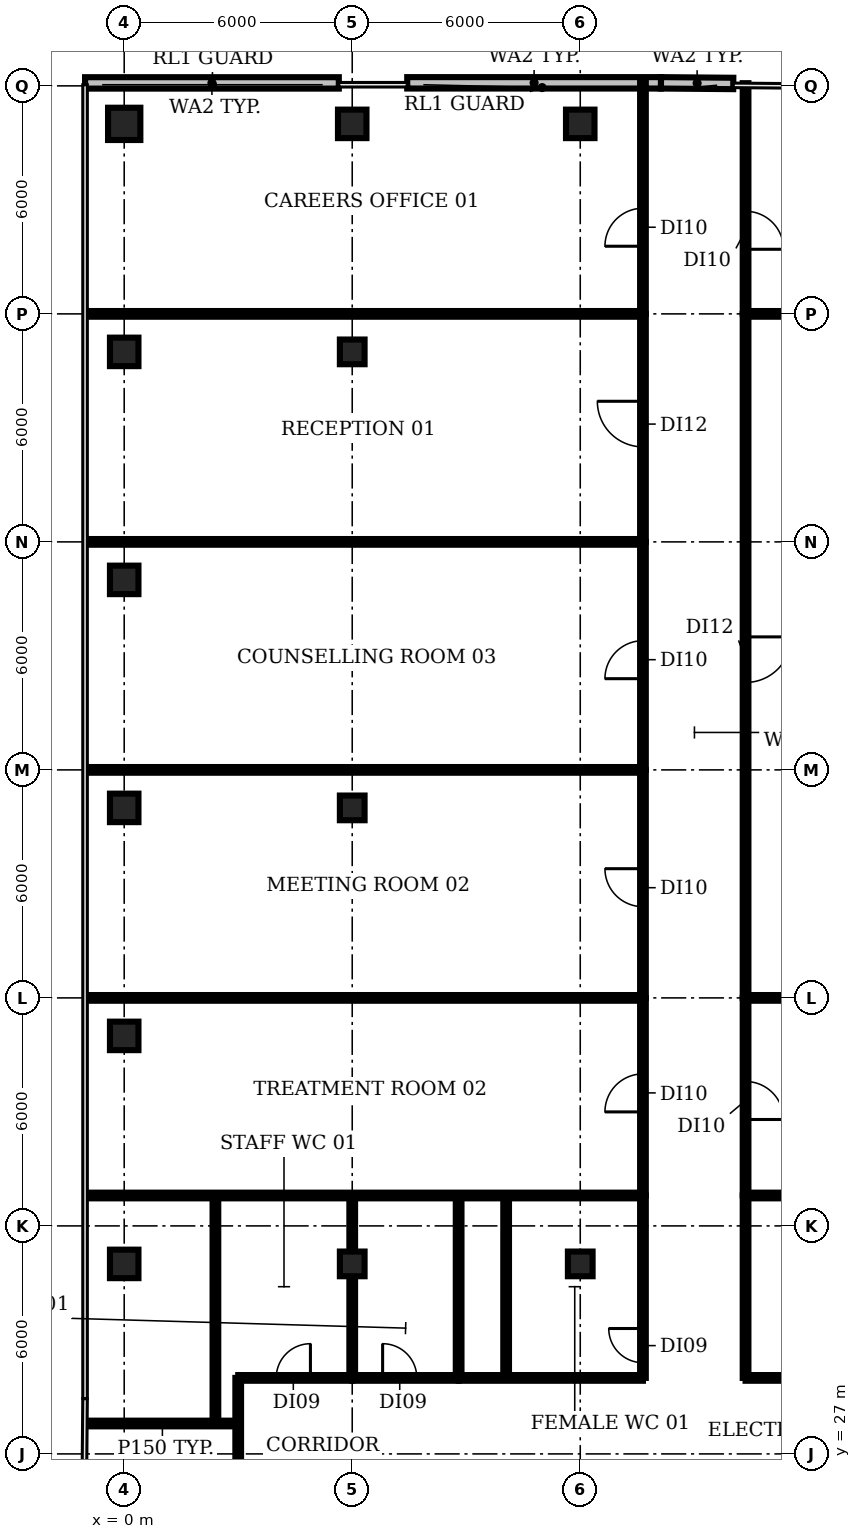
"""IFC4 building model, lengths in metres.
Left out: names, types, materials, properties, quantities, classifications, styles, units other than length and angle.
Written with IfcOpenShell. Run it as: python <this file> out.ifc"""

import sys

from ifc_helpers import new_model, si_unit, direction, frame, frame_2d, origin, origin_2d, place, context, subcontext, project, spatial, rectangle, circle, extrude, element, fill, save


model = new_model("IFC4")
c1 = context("Model", 3, precision=1e-05, world=origin(), true_north=direction((0.0, 1.0)))
c2 = subcontext(c1, "Body", "Model", "MODEL_VIEW")
j1 = project(units=[si_unit("LENGTHUNIT", "METRE"), si_unit("PLANEANGLEUNIT", "RADIAN")], contexts=[c1])
p1 = place(None, origin())
s1 = spatial("IfcSite", under=j1, at=p1, CompositionType="ELEMENT")
p2 = place(p1, origin())
s2 = spatial("IfcBuilding", under=s1, at=p2, CompositionType="ELEMENT")
p3 = place(p2, frame((0.0, 0.0, 285.2)))
s3 = spatial("IfcBuildingStorey", under=s2, at=p3, CompositionType="ELEMENT", Elevation=285.2)
for number, where, z_axis, x_axis in (
    (1, (0.0, 32.0, 0.0), (0.0, 0.0, 1.0), (1.0, 0.0, 0.0)),
    (2, (0.0, 38.0, 0.0), (0.0, 0.0, 1.0), (1.0, 0.0, 0.0)),
    (3, (0.0, 44.0, 0.0), (0.0, 0.0, 1.0), (1.0, 0.0, 0.0)),
    (4, (0.0, 50.0, 0.0), (0.0, 0.0, 1.0), (1.0, 0.0, 0.0)),
    (5, (0.0, 56.0, 0.0), (0.0, 0.0, 1.0), (1.0, 0.0, 0.0)),
):
    element("IfcColumn", number, at=place(p3, frame(where, z_axis=z_axis, x_axis=x_axis)), inside=s3, PredefinedType="COLUMN", context=c2, shape_type="SweptSolid", body=[
        extrude(rectangle(XDim=0.75, YDim=0.75, at=origin_2d()), origin(), (0.0, 0.0, 1.0), 3.85),
    ])
p4 = place(p3, frame((0.0, 62.0, 0.0), z_axis=(0.0, 0.0, 1.0), x_axis=(1.0, 0.0, 0.0)))
e6 = element("IfcColumn", 6, at=p4, inside=s3, PredefinedType="COLUMN", context=c2, shape_type="SweptSolid", body=[
    extrude(circle(Radius=0.425, at=origin_2d()), origin(), (0.0, 0.0, 1.0), 3.85),
])
for number, where, z_axis, x_axis in (
    (7, (6.0, 32.0, 0.0), (0.0, 0.0, 1.0), (1.0, 0.0, 0.0)),
    (8, (6.0, 44.0, 0.0), (0.0, 0.0, 1.0), (1.0, 0.0, 0.0)),
    (9, (6.0, 56.0, 0.0), (0.0, 0.0, 1.0), (1.0, 0.0, 0.0)),
):
    element("IfcColumn", number, at=place(p3, frame(where, z_axis=z_axis, x_axis=x_axis)), inside=s3, PredefinedType="COLUMN", context=c2, shape_type="SweptSolid", body=[
        extrude(rectangle(XDim=0.65, YDim=0.65, at=origin_2d()), origin(), (0.0, 0.0, 1.0), 3.85),
    ])
p5 = place(p3, frame((6.0, 62.0, 0.0), z_axis=(0.0, 0.0, 1.0), x_axis=(1.0, 0.0, 0.0)))
e10 = element("IfcColumn", 10, at=p5, inside=s3, PredefinedType="COLUMN", context=c2, shape_type="SweptSolid", body=[
    extrude(rectangle(XDim=0.75, YDim=0.75, at=origin_2d()), origin(), (0.0, 0.0, 1.0), 3.85),
])
p6 = place(p3, frame((12.0, 32.0, 0.0), z_axis=(0.0, 0.0, 1.0), x_axis=(1.0, 0.0, 0.0)))
e11 = element("IfcColumn", 11, at=p6, inside=s3, PredefinedType="COLUMN", context=c2, shape_type="SweptSolid", body=[
    extrude(rectangle(XDim=0.65, YDim=0.65, at=origin_2d()), origin(), (0.0, 0.0, 1.0), 3.85),
])
p7 = place(p3, frame((12.0, 62.0, 0.0), z_axis=(0.0, 0.0, 1.0), x_axis=(1.0, 0.0, 0.0)))
e12 = element("IfcColumn", 12, at=p7, inside=s3, PredefinedType="COLUMN", context=c2, shape_type="SweptSolid", body=[
    extrude(rectangle(XDim=0.75, YDim=0.75, at=origin_2d()), origin(), (0.0, 0.0, 1.0), 3.85),
])
for number, where, z_axis, x_axis in (
    (13, (14.124, 63.08, 0.0), (0.0, 0.0, 1.0), (-1.0, 0.0, 0.0)),
    (14, (5.647, 63.078, 0.0), (0.0, 0.0, 1.0), (-1.0, 0.0, 0.0)),
):
    element("IfcWall", number, at=place(p3, frame(where, z_axis=z_axis, x_axis=x_axis)), inside=s3, PredefinedType="SOLIDWALL", context=c2, shape_type="SweptSolid", body=[
        extrude(rectangle(XDim=6.677, YDim=0.3, at=frame_2d((3.339, 0.0))), origin(), (0.0, 0.0, 1.0), 3.85),
    ])
p8 = place(p3, frame((16.027, 63.063, 0.0), z_axis=(0.0, 0.0, 1.0), x_axis=(-0.999961913014, 0.008727687086, 0.0)))
e15 = element("IfcWall", 15, at=p8, inside=s3, PredefinedType="SOLIDWALL", context=c2, shape_type="SweptSolid", body=[
    extrude(rectangle(XDim=1.902, YDim=0.3, at=frame_2d((0.951, 0.0))), origin(), (0.0, 0.0, 1.0), 3.85),
])
p9 = place(p3, frame((-0.99, 27.8, 0.0), z_axis=(0.0, 0.0, 1.0), x_axis=(1.0, 0.0, 0.0)))
e16 = element("IfcWall", 16, at=p9, inside=s3, PredefinedType="PARTITIONING", context=c2, shape_type="SweptSolid", body=[
    extrude(rectangle(XDim=3.99, YDim=0.15, at=frame_2d((1.995, 0.0))), origin(), (0.0, 0.0, 1.0), 2.9),
])
for number, where, z_axis, x_axis in (
    (17, (-0.98, 33.8, 0.0), (0.0, 0.0, 1.0), (1.0, 0.0, 0.0)),
    (18, (-0.98, 39.0, 0.0), (0.0, 0.0, 1.0), (1.0, 0.0, 0.0)),
    (19, (-0.98, 45.0, 0.0), (0.0, 0.0, 1.0), (1.0, 0.0, 0.0)),
    (20, (-0.98, 51.0, 0.0), (0.0, 0.0, 1.0), (1.0, 0.0, 0.0)),
    (21, (-0.98, 57.0, 0.0), (0.0, 0.0, 1.0), (1.0, 0.0, 0.0)),
):
    element("IfcWall", number, at=place(p3, frame(where, z_axis=z_axis, x_axis=x_axis)), inside=s3, PredefinedType="PARTITIONING", context=c2, shape_type="SweptSolid", body=[
        extrude(rectangle(XDim=14.63, YDim=0.15, at=frame_2d((7.315, 0.0))), origin(), (0.0, 0.0, 1.0), 2.9),
    ])
p10 = place(p3, frame((2.4, 27.8, 0.0), z_axis=(0.0, 0.0, 1.0), x_axis=(0.0, 1.0, 0.0)))
e22 = element("IfcWall", 22, at=p10, inside=s3, PredefinedType="PARTITIONING", context=c2, shape_type="SweptSolid", body=[
    extrude(rectangle(XDim=6.0, YDim=0.15, at=frame_2d((3.0, 0.0))), origin(), (0.0, 0.0, 1.0), 2.9),
])
p11 = place(p3, frame((3.0, 25.1, 0.0), z_axis=(0.0, 0.0, 1.0), x_axis=(0.0, 1.0, 0.0)))
e23 = element("IfcWall", 23, at=p11, inside=s3, PredefinedType="PARTITIONING", context=c2, shape_type="SweptSolid", body=[
    extrude(rectangle(XDim=3.9, YDim=0.15, at=frame_2d((1.95, 0.0))), origin(), (0.0, 0.0, 1.0), 2.9),
])
p12 = place(p3, frame((3.0, 29.0, 0.0), z_axis=(0.0, 0.0, 1.0), x_axis=(1.0, 0.0, 0.0)))
e24 = element("IfcWall", 24, at=p12, inside=s3, PredefinedType="PARTITIONING", context=c2, shape_type="SweptSolid", body=[
    extrude(rectangle(XDim=3.0, YDim=0.15, at=frame_2d((1.5, 0.0))), origin(), (0.0, 0.0, 1.0), 2.9),
])
p13 = place(p12, frame((1.0, 0.0, 0.0)))
e25 = element("IfcOpeningElement", 25, at=p13, cuts=e24, PredefinedType="OPENING", context=c2, shape_type="SweptSolid", body=[
    extrude(rectangle(XDim=0.9, YDim=2.1, at=frame_2d((0.45, 1.05))), frame((0.0, 0.085, 0.0), z_axis=(0.0, -1.0, 0.0), x_axis=(1.0, 0.0, 0.0)), (0.0, 0.0, 1.0), 0.17),
])
p14 = place(p3, frame((6.0, 29.0, 0.0), z_axis=(0.0, 0.0, 1.0), x_axis=(0.0, 1.0, 0.0)))
e26 = element("IfcWall", 26, at=p14, inside=s3, PredefinedType="PARTITIONING", context=c2, shape_type="SweptSolid", body=[
    extrude(rectangle(XDim=4.8, YDim=0.15, at=frame_2d((2.4, 0.0))), origin(), (0.0, 0.0, 1.0), 2.9),
])
p15 = place(p3, frame((6.0, 29.0, 0.0), z_axis=(0.0, 0.0, 1.0), x_axis=(1.0, 0.0, 0.0)))
e27 = element("IfcWall", 27, at=p15, inside=s3, PredefinedType="PARTITIONING", context=c2, shape_type="SweptSolid", body=[
    extrude(rectangle(XDim=2.8, YDim=0.15, at=frame_2d((1.4, 0.0))), origin(), (0.0, 0.0, 1.0), 2.9),
])
p16 = place(p15, frame((0.8, 0.0, 0.0)))
e28 = element("IfcOpeningElement", 28, at=p16, cuts=e27, PredefinedType="OPENING", context=c2, shape_type="SweptSolid", body=[
    extrude(rectangle(XDim=0.9, YDim=2.1, at=frame_2d((0.45, 1.05))), frame((0.0, 0.085, 0.0), z_axis=(0.0, -1.0, 0.0), x_axis=(1.0, 0.0, 0.0)), (0.0, 0.0, 1.0), 0.17),
])
p17 = place(p3, frame((8.8, 29.0, 0.0), z_axis=(0.0, 0.0, 1.0), x_axis=(0.0, 1.0, 0.0)))
e29 = element("IfcWall", 29, at=p17, inside=s3, PredefinedType="PARTITIONING", context=c2, shape_type="SweptSolid", body=[
    extrude(rectangle(XDim=4.8, YDim=0.15, at=frame_2d((2.4, 0.0))), origin(), (0.0, 0.0, 1.0), 2.9),
])
p18 = place(p3, frame((8.8, 29.0, 0.0), z_axis=(0.0, 0.0, 1.0), x_axis=(1.0, 0.0, 0.0)))
e30 = element("IfcWall", 30, at=p18, inside=s3, PredefinedType="PARTITIONING", context=c2, shape_type="SweptSolid", body=[
    extrude(rectangle(XDim=4.85, YDim=0.15, at=frame_2d((2.425, 0.0))), origin(), (0.0, 0.0, 1.0), 2.9),
])
p19 = place(p3, frame((10.05, 29.0, 0.0), z_axis=(0.0, 0.0, 1.0), x_axis=(0.0, 1.0, 0.0)))
e31 = element("IfcWall", 31, at=p19, inside=s3, PredefinedType="PARTITIONING", context=c2, shape_type="SweptSolid", body=[
    extrude(rectangle(XDim=4.8, YDim=0.15, at=frame_2d((2.4, 0.0))), origin(), (0.0, 0.0, 1.0), 2.9),
])
p20 = place(p3, frame((13.65, 29.0, 0.0), z_axis=(0.0, 0.0, 1.0), x_axis=(0.0, 1.0, 0.0)))
e32 = element("IfcWall", 32, at=p20, inside=s3, PredefinedType="PARTITIONING", context=c2, shape_type="SweptSolid", body=[
    extrude(rectangle(XDim=4.8, YDim=0.15, at=frame_2d((2.4, 0.0))), origin(), (0.0, 0.0, 1.0), 2.9),
])
p21 = place(p20, frame((0.4, 0.0, 0.0)))
e33 = element("IfcOpeningElement", 33, at=p21, cuts=e32, PredefinedType="OPENING", context=c2, shape_type="SweptSolid", body=[
    extrude(rectangle(XDim=0.9, YDim=2.1, at=frame_2d((0.45, 1.05))), frame((0.0, 0.085, 0.0), z_axis=(0.0, -1.0, 0.0), x_axis=(1.0, 0.0, 0.0)), (0.0, 0.0, 1.0), 0.17),
])
p22 = place(p3, frame((13.65, 33.8, 0.0), z_axis=(0.0, 0.0, 1.0), x_axis=(0.0, 1.0, 0.0)))
e34 = element("IfcWall", 34, at=p22, inside=s3, PredefinedType="PARTITIONING", context=c2, shape_type="SweptSolid", body=[
    extrude(rectangle(XDim=5.2, YDim=0.15, at=frame_2d((2.6, 0.0))), origin(), (0.0, 0.0, 1.0), 2.9),
])
p23 = place(p22, frame((2.2, 0.0, 0.0)))
e35 = element("IfcOpeningElement", 35, at=p23, cuts=e34, PredefinedType="OPENING", context=c2, shape_type="SweptSolid", body=[
    extrude(rectangle(XDim=1.0, YDim=2.1, at=frame_2d((0.5, 1.05))), frame((0.0, 0.085, 0.0), z_axis=(0.0, -1.0, 0.0), x_axis=(1.0, 0.0, 0.0)), (0.0, 0.0, 1.0), 0.17),
])
p24 = place(p3, frame((13.65, 39.0, 0.0), z_axis=(0.0, 0.0, 1.0), x_axis=(0.0, 1.0, 0.0)))
e36 = element("IfcWall", 36, at=p24, inside=s3, PredefinedType="PARTITIONING", context=c2, shape_type="SweptSolid", body=[
    extrude(rectangle(XDim=6.0, YDim=0.15, at=frame_2d((3.0, 0.0))), origin(), (0.0, 0.0, 1.0), 2.9),
])
p25 = place(p24, frame((2.4, 0.0, 0.0)))
e37 = element("IfcOpeningElement", 37, at=p25, cuts=e36, PredefinedType="OPENING", context=c2, shape_type="SweptSolid", body=[
    extrude(rectangle(XDim=1.0, YDim=2.1, at=frame_2d((0.5, 1.05))), frame((0.0, 0.085, 0.0), z_axis=(0.0, -1.0, 0.0), x_axis=(1.0, 0.0, 0.0)), (0.0, 0.0, 1.0), 0.17),
])
p26 = place(p3, frame((13.65, 45.0, 0.0), z_axis=(0.0, 0.0, 1.0), x_axis=(0.0, 1.0, 0.0)))
e38 = element("IfcWall", 38, at=p26, inside=s3, PredefinedType="PARTITIONING", context=c2, shape_type="SweptSolid", body=[
    extrude(rectangle(XDim=6.0, YDim=0.15, at=frame_2d((3.0, 0.0))), origin(), (0.0, 0.0, 1.0), 2.9),
])
p27 = place(p26, frame((2.4, 0.0, 0.0)))
e39 = element("IfcOpeningElement", 39, at=p27, cuts=e38, PredefinedType="OPENING", context=c2, shape_type="SweptSolid", body=[
    extrude(rectangle(XDim=1.0, YDim=2.1, at=frame_2d((0.5, 1.05))), frame((0.0, 0.085, 0.0), z_axis=(0.0, -1.0, 0.0), x_axis=(1.0, 0.0, 0.0)), (0.0, 0.0, 1.0), 0.17),
])
p28 = place(p3, frame((13.65, 51.0, 0.0), z_axis=(0.0, 0.0, 1.0), x_axis=(0.0, 1.0, 0.0)))
e40 = element("IfcWall", 40, at=p28, inside=s3, PredefinedType="PARTITIONING", context=c2, shape_type="SweptSolid", body=[
    extrude(rectangle(XDim=6.0, YDim=0.15, at=frame_2d((3.0, 0.0))), origin(), (0.0, 0.0, 1.0), 2.9),
])
p29 = place(p28, frame((2.5, 0.0, 0.0)))
e41 = element("IfcOpeningElement", 41, at=p29, cuts=e40, PredefinedType="OPENING", context=c2, shape_type="SweptSolid", body=[
    extrude(rectangle(XDim=1.2, YDim=2.1, at=frame_2d((0.6, 1.05))), frame((0.0, 0.085, 0.0), z_axis=(0.0, -1.0, 0.0), x_axis=(1.0, 0.0, 0.0)), (0.0, 0.0, 1.0), 0.17),
])
p30 = place(p3, frame((13.65, 57.0, 0.0), z_axis=(0.0, 0.0, 1.0), x_axis=(0.0, 1.0, 0.0)))
e42 = element("IfcWall", 42, at=p30, inside=s3, PredefinedType="PARTITIONING", context=c2, shape_type="SweptSolid", body=[
    extrude(rectangle(XDim=6.09, YDim=0.15, at=frame_2d((3.045, 0.0))), origin(), (0.0, 0.0, 1.0), 2.9),
])
p31 = place(p30, frame((1.78, 0.0, 0.0)))
e43 = element("IfcOpeningElement", 43, at=p31, cuts=e42, PredefinedType="OPENING", context=c2, shape_type="SweptSolid", body=[
    extrude(rectangle(XDim=1.0, YDim=2.1, at=frame_2d((0.5, 1.05))), frame((0.0, 0.085, 0.0), z_axis=(0.0, -1.0, 0.0), x_axis=(1.0, 0.0, 0.0)), (0.0, 0.0, 1.0), 0.17),
])
p32 = place(p3, frame((16.35, 29.0, 0.0), z_axis=(0.0, 0.0, 1.0), x_axis=(0.0, 1.0, 0.0)))
e44 = element("IfcWall", 44, at=p32, inside=s3, PredefinedType="PARTITIONING", context=c2, shape_type="SweptSolid", body=[
    extrude(rectangle(XDim=4.8, YDim=0.15, at=frame_2d((2.4, 0.0))), origin(), (0.0, 0.0, 1.0), 2.9),
])
p33 = place(p3, frame((16.35, 29.0, 0.0), z_axis=(0.0, 0.0, 1.0), x_axis=(1.0, 0.0, 0.0)))
e45 = element("IfcWall", 45, at=p33, inside=s3, PredefinedType="PARTITIONING", context=c2, shape_type="SweptSolid", body=[
    extrude(rectangle(XDim=5.08, YDim=0.15, at=frame_2d((2.54, 0.0))), origin(), (0.0, 0.0, 1.0), 2.9),
])
p34 = place(p3, frame((16.35, 33.8, 0.0), z_axis=(0.0, 0.0, 1.0), x_axis=(1.0, 0.0, 0.0)))
e46 = element("IfcWall", 46, at=p34, inside=s3, PredefinedType="PARTITIONING", context=c2, shape_type="SweptSolid", body=[
    extrude(rectangle(XDim=8.68, YDim=0.15, at=frame_2d((4.34, 0.0))), origin(), (0.0, 0.0, 1.0), 2.9),
])
p35 = place(p3, frame((16.35, 39.0, 0.0), z_axis=(0.0, 0.0, 1.0), x_axis=(0.0, -1.0, 0.0)))
e47 = element("IfcWall", 47, at=p35, inside=s3, PredefinedType="PARTITIONING", context=c2, shape_type="SweptSolid", body=[
    extrude(rectangle(XDim=5.2, YDim=0.15, at=frame_2d((2.6, 0.0))), origin(), (0.0, 0.0, 1.0), 2.9),
])
p36 = place(p35, frame((2.2, 0.0, 0.0)))
e48 = element("IfcOpeningElement", 48, at=p36, cuts=e47, PredefinedType="OPENING", context=c2, shape_type="SweptSolid", body=[
    extrude(rectangle(XDim=1.0, YDim=2.1, at=frame_2d((0.5, 1.05))), frame((0.0, 0.085, 0.0), z_axis=(0.0, -1.0, 0.0), x_axis=(1.0, 0.0, 0.0)), (0.0, 0.0, 1.0), 0.17),
])
p37 = place(p3, frame((16.35, 39.0, 0.0), z_axis=(0.0, 0.0, 1.0), x_axis=(1.0, 0.0, 0.0)))
e49 = element("IfcWall", 49, at=p37, inside=s3, PredefinedType="PARTITIONING", context=c2, shape_type="SweptSolid", body=[
    extrude(rectangle(XDim=8.72, YDim=0.15, at=frame_2d((4.36, 0.0))), origin(), (0.0, 0.0, 1.0), 2.9),
])
p38 = place(p3, frame((16.35, 57.0, 0.0), z_axis=(0.0, 0.0, 1.0), x_axis=(0.0, -1.0, 0.0)))
e50 = element("IfcWall", 50, at=p38, inside=s3, PredefinedType="PARTITIONING", context=c2, shape_type="SweptSolid", body=[
    extrude(rectangle(XDim=18.0, YDim=0.15, at=frame_2d((9.0, 0.0))), origin(), (0.0, 0.0, 1.0), 2.9),
])
p39 = place(p38, frame((8.5, 0.0, 0.0)))
e51 = element("IfcOpeningElement", 51, at=p39, cuts=e50, PredefinedType="OPENING", context=c2, shape_type="SweptSolid", body=[
    extrude(rectangle(XDim=1.2, YDim=2.1, at=frame_2d((0.6, 1.05))), frame((0.0, 0.085, 0.0), z_axis=(0.0, -1.0, 0.0), x_axis=(1.0, 0.0, 0.0)), (0.0, 0.0, 1.0), 0.17),
])
p40 = place(p3, frame((16.35, 57.0, 0.0), z_axis=(0.0, 0.0, 1.0), x_axis=(1.0, 0.0, 0.0)))
e52 = element("IfcWall", 52, at=p40, inside=s3, PredefinedType="PARTITIONING", context=c2, shape_type="SweptSolid", body=[
    extrude(rectangle(XDim=8.88, YDim=0.15, at=frame_2d((4.44, 0.0))), origin(), (0.0, 0.0, 1.0), 2.9),
])
p41 = place(p3, frame((16.35, 63.071, 0.0), z_axis=(0.0, 0.0, 1.0), x_axis=(0.0, -1.0, 0.0)))
e53 = element("IfcWall", 53, at=p41, inside=s3, PredefinedType="PARTITIONING", context=c2, shape_type="SweptSolid", body=[
    extrude(rectangle(XDim=6.071, YDim=0.15, at=frame_2d((3.035, 0.0))), origin(), (0.0, 0.0, 1.0), 2.9),
])
p42 = place(p41, frame((3.371, 0.0, 0.0)))
e54 = element("IfcOpeningElement", 54, at=p42, cuts=e53, PredefinedType="OPENING", context=c2, shape_type="SweptSolid", body=[
    extrude(rectangle(XDim=1.0, YDim=2.1, at=frame_2d((0.5, 1.05))), frame((0.0, 0.085, 0.0), z_axis=(0.0, -1.0, 0.0), x_axis=(1.0, 0.0, 0.0)), (0.0, 0.0, 1.0), 0.17),
])
p43 = place(p13, origin())
e55 = element("IfcDoor", 55, at=p43, inside=s3, OperationType="SINGLE_SWING_RIGHT", PredefinedType="DOOR", context=c2, shape_type="SweptSolid", body=[
    extrude(rectangle(XDim=0.9, YDim=2.1, at=frame_2d((0.45, 1.05))), frame((0.0, 0.025, 0.0), z_axis=(0.0, -1.0, 0.0), x_axis=(1.0, 0.0, 0.0)), (0.0, 0.0, 1.0), 0.05),
])
fill(e25, e55)
p44 = place(p16, origin())
e56 = element("IfcDoor", 56, at=p44, inside=s3, OperationType="SINGLE_SWING_LEFT", PredefinedType="DOOR", context=c2, shape_type="SweptSolid", body=[
    extrude(rectangle(XDim=0.9, YDim=2.1, at=frame_2d((0.45, 1.05))), frame((0.0, 0.025, 0.0), z_axis=(0.0, -1.0, 0.0), x_axis=(1.0, 0.0, 0.0)), (0.0, 0.0, 1.0), 0.05),
])
fill(e28, e56)
p45 = place(p21, origin())
e57 = element("IfcDoor", 57, at=p45, inside=s3, OperationType="SINGLE_SWING_RIGHT", PredefinedType="DOOR", context=c2, shape_type="SweptSolid", body=[
    extrude(rectangle(XDim=0.9, YDim=2.1, at=frame_2d((0.45, 1.05))), frame((0.0, 0.025, 0.0), z_axis=(0.0, -1.0, 0.0), x_axis=(1.0, 0.0, 0.0)), (0.0, 0.0, 1.0), 0.05),
])
fill(e33, e57)
p46 = place(p23, origin())
e58 = element("IfcDoor", 58, at=p46, inside=s3, OperationType="SINGLE_SWING_LEFT", PredefinedType="DOOR", context=c2, shape_type="SweptSolid", body=[
    extrude(rectangle(XDim=1.0, YDim=2.1, at=frame_2d((0.5, 1.05))), frame((0.0, 0.025, 0.0), z_axis=(0.0, -1.0, 0.0), x_axis=(1.0, 0.0, 0.0)), (0.0, 0.0, 1.0), 0.05),
])
fill(e35, e58)
p47 = place(p25, origin())
e59 = element("IfcDoor", 59, at=p47, inside=s3, OperationType="SINGLE_SWING_RIGHT", PredefinedType="DOOR", context=c2, shape_type="SweptSolid", body=[
    extrude(rectangle(XDim=1.0, YDim=2.1, at=frame_2d((0.5, 1.05))), frame((0.0, 0.025, 0.0), z_axis=(0.0, -1.0, 0.0), x_axis=(1.0, 0.0, 0.0)), (0.0, 0.0, 1.0), 0.05),
])
fill(e37, e59)
p48 = place(p27, origin())
e60 = element("IfcDoor", 60, at=p48, inside=s3, OperationType="SINGLE_SWING_LEFT", PredefinedType="DOOR", context=c2, shape_type="SweptSolid", body=[
    extrude(rectangle(XDim=1.0, YDim=2.1, at=frame_2d((0.5, 1.05))), frame((0.0, 0.025, 0.0), z_axis=(0.0, -1.0, 0.0), x_axis=(1.0, 0.0, 0.0)), (0.0, 0.0, 1.0), 0.05),
])
fill(e39, e60)
p49 = place(p29, origin())
e61 = element("IfcDoor", 61, at=p49, inside=s3, OperationType="SINGLE_SWING_RIGHT", PredefinedType="DOOR", context=c2, shape_type="SweptSolid", body=[
    extrude(rectangle(XDim=1.2, YDim=2.1, at=frame_2d((0.6, 1.05))), frame((0.0, 0.025, 0.0), z_axis=(0.0, -1.0, 0.0), x_axis=(1.0, 0.0, 0.0)), (0.0, 0.0, 1.0), 0.05),
])
fill(e41, e61)
p50 = place(p31, origin())
e62 = element("IfcDoor", 62, at=p50, inside=s3, OperationType="SINGLE_SWING_LEFT", PredefinedType="DOOR", context=c2, shape_type="SweptSolid", body=[
    extrude(rectangle(XDim=1.0, YDim=2.1, at=frame_2d((0.5, 1.05))), frame((0.0, 0.025, 0.0), z_axis=(0.0, -1.0, 0.0), x_axis=(1.0, 0.0, 0.0)), (0.0, 0.0, 1.0), 0.05),
])
fill(e43, e62)
p51 = place(p36, origin())
e63 = element("IfcDoor", 63, at=p51, inside=s3, OperationType="SINGLE_SWING_RIGHT", PredefinedType="DOOR", context=c2, shape_type="SweptSolid", body=[
    extrude(rectangle(XDim=1.0, YDim=2.1, at=frame_2d((0.5, 1.05))), frame((0.0, 0.025, 0.0), z_axis=(0.0, -1.0, 0.0), x_axis=(1.0, 0.0, 0.0)), (0.0, 0.0, 1.0), 0.05),
])
fill(e48, e63)
p52 = place(p39, origin())
e64 = element("IfcDoor", 64, at=p52, inside=s3, OperationType="SINGLE_SWING_LEFT", PredefinedType="DOOR", context=c2, shape_type="SweptSolid", body=[
    extrude(rectangle(XDim=1.2, YDim=2.1, at=frame_2d((0.6, 1.05))), frame((0.0, 0.025, 0.0), z_axis=(0.0, -1.0, 0.0), x_axis=(1.0, 0.0, 0.0)), (0.0, 0.0, 1.0), 0.05),
])
fill(e51, e64)
p53 = place(p42, origin())
e65 = element("IfcDoor", 65, at=p53, inside=s3, OperationType="SINGLE_SWING_RIGHT", PredefinedType="DOOR", context=c2, shape_type="SweptSolid", body=[
    extrude(rectangle(XDim=1.0, YDim=2.1, at=frame_2d((0.5, 1.05))), frame((0.0, 0.025, 0.0), z_axis=(0.0, -1.0, 0.0), x_axis=(1.0, 0.0, 0.0)), (0.0, 0.0, 1.0), 0.05),
])
fill(e54, e65)
save(model, sys.argv[1])
